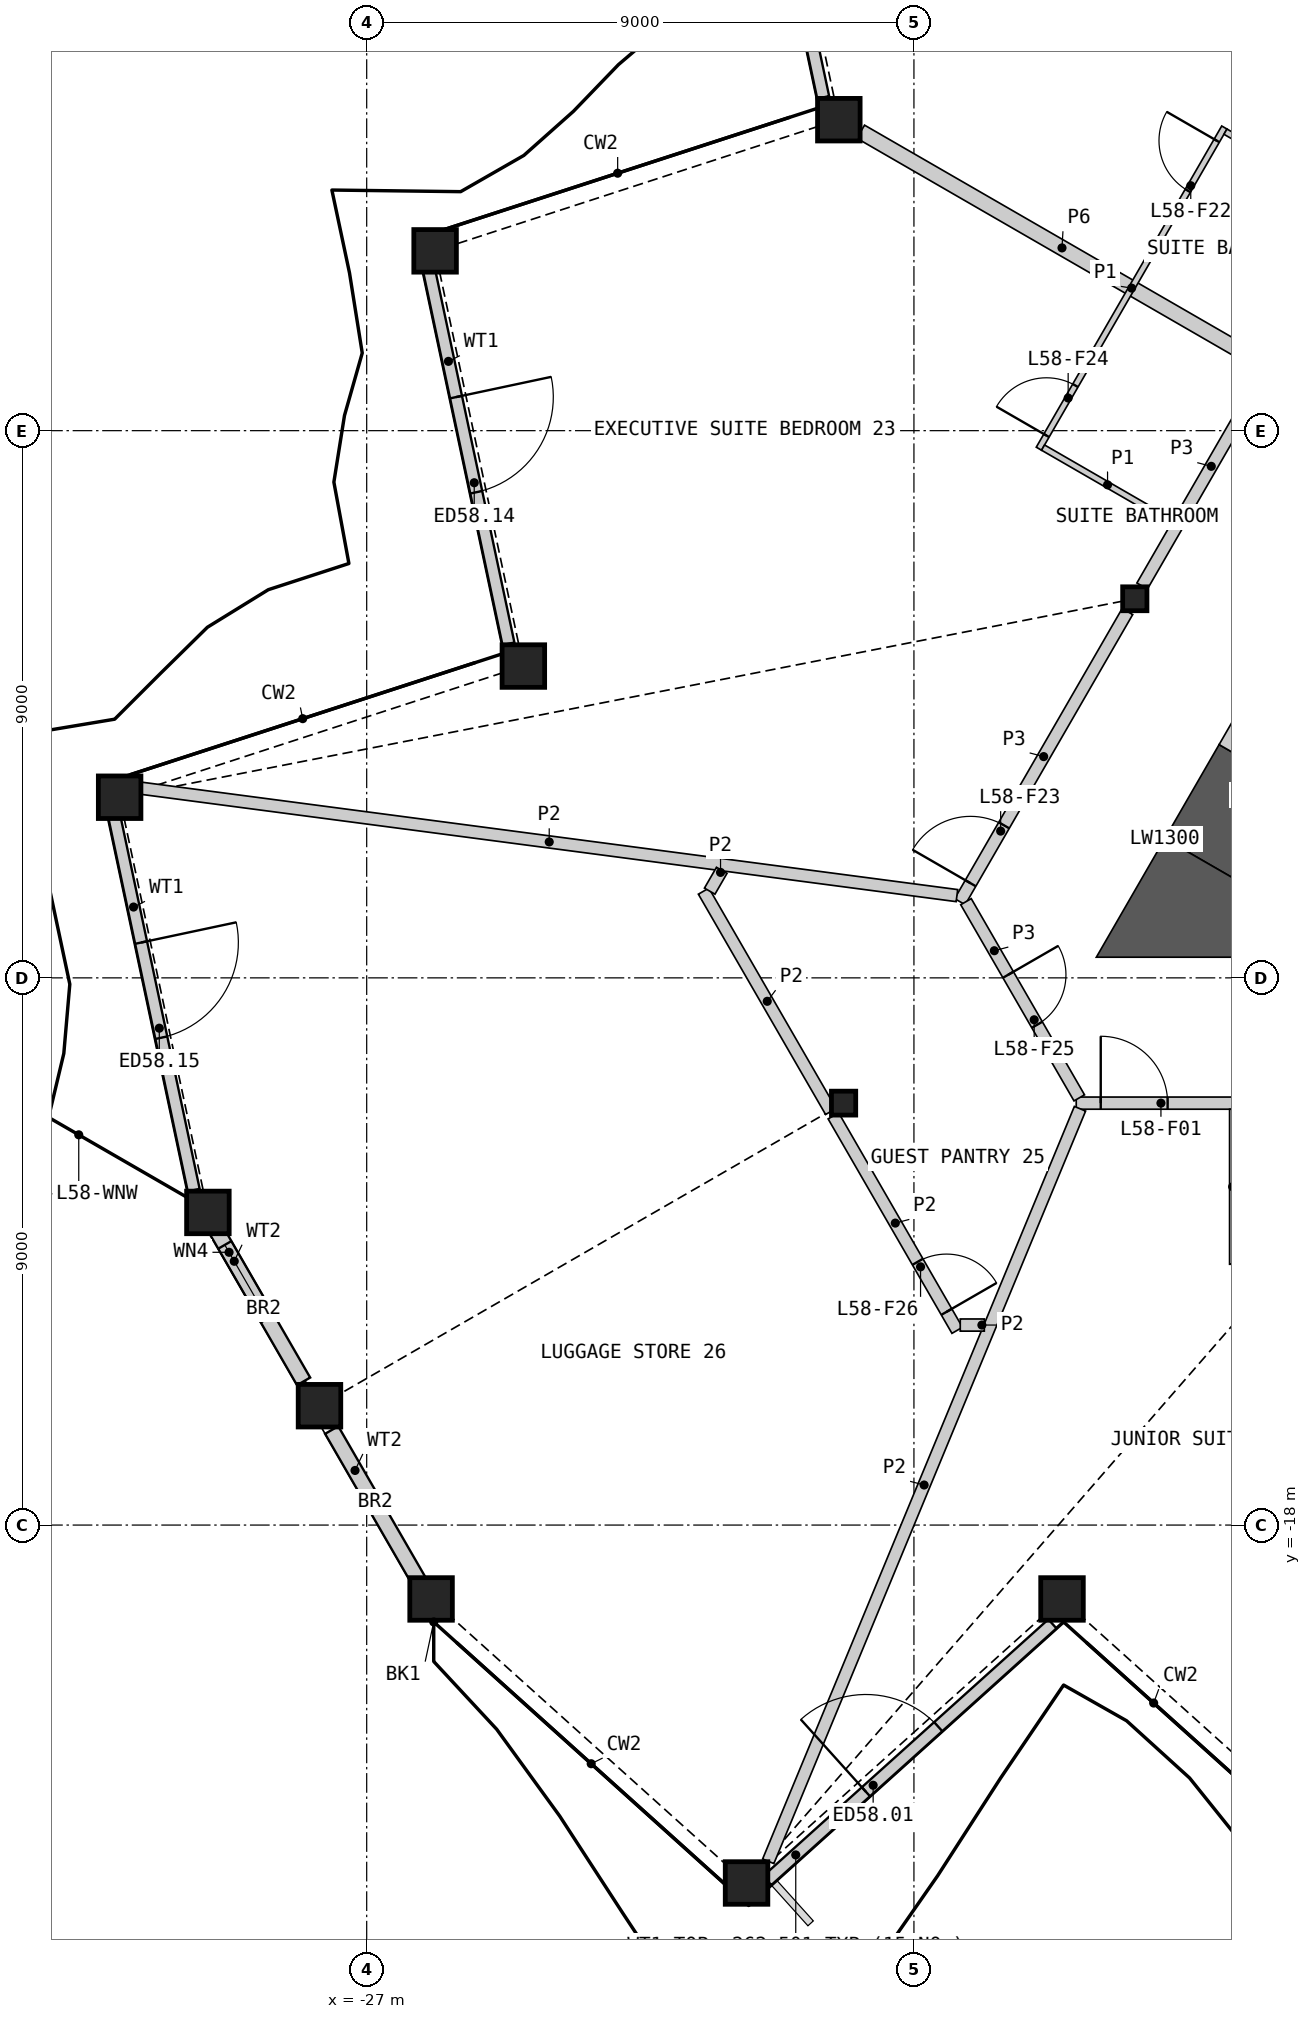
"""IFC4 building model, lengths in metres.
Left out: names, types, materials, properties, quantities, classifications, styles, units other than length and angle.
Written with IfcOpenShell. Run it as: python <this file> out.ifc"""

import sys

from ifc_helpers import new_model, si_unit, direction, frame, frame_2d, origin, origin_2d, place, context, subcontext, project, spatial, polyline, rectangle, hollow_rectangle, i_section, outline, extrude, element, fill, save


model = new_model("IFC4")
c1 = context("Model", 3, precision=1e-05, world=origin(), true_north=direction((0.0, 1.0)))
c2 = subcontext(c1, "Body", "Model", "MODEL_VIEW")
j1 = project(units=[si_unit("LENGTHUNIT", "METRE"), si_unit("PLANEANGLEUNIT", "RADIAN")], contexts=[c1])
p1 = place(None, origin())
s1 = spatial("IfcSite", under=j1, at=p1, CompositionType="ELEMENT")
p2 = place(p1, origin())
s2 = spatial("IfcBuilding", under=s1, at=p2, CompositionType="ELEMENT")
p3 = place(p2, frame((0.0, 0.0, 259.8)))
s3 = spatial("IfcBuildingStorey", under=s2, at=p3, CompositionType="ELEMENT", Elevation=259.8)
for number, where, z_axis, x_axis in (
    (1, (-25.941, -19.215, 0.0), (0.0, 0.0, 1.0), (1.0, 0.0, 0.0)),
    (2, (-20.753, -23.887, 0.0), (0.0, 0.0, 1.0), (1.0, 0.0, 0.0)),
    (3, (-15.565, -19.215, 0.0), (0.0, 0.0, 1.0), (1.0, 0.0, 0.0)),
    (4, (-19.235, 5.115, 0.0), (0.0, 0.0, 1.0), (1.0, 0.0, 0.0)),
    (5, (-25.875, 2.957, 0.0), (0.0, 0.0, 1.0), (1.0, 0.0, 0.0)),
    (6, (-24.423, -3.872, 0.0), (0.0, 0.0, 1.0), (1.0, 0.0, 0.0)),
    (7, (-31.063, -6.029, 0.0), (0.0, 0.0, 1.0), (1.0, 0.0, 0.0)),
    (8, (-29.612, -12.858, 0.0), (0.0, 0.0, 1.0), (1.0, 0.0, 0.0)),
    (9, (-27.776, -16.037, 0.0), (0.0, 0.0, 1.0), (1.0, 0.0, 0.0)),
):
    element("IfcColumn", number, at=place(p3, frame(where, z_axis=z_axis, x_axis=x_axis)), inside=s3, PredefinedType="COLUMN", context=c2, shape_type="SweptSolid", body=[
        extrude(hollow_rectangle(XDim=0.7, YDim=0.7, WallThickness=0.045, at=origin_2d()), origin(), (0.0, 0.0, 1.0), 3.6),
    ])
for number, where, z_axis, x_axis in (
    (10, (-14.368, -2.765, 0.0), (0.0, 0.0, 1.0), (1.0, 0.0, 0.0)),
    (11, (-19.157, -11.06, 0.0), (0.0, 0.0, 1.0), (1.0, 0.0, 0.0)),
):
    element("IfcColumn", number, at=place(p3, frame(where, z_axis=z_axis, x_axis=x_axis)), inside=s3, PredefinedType="COLUMN", context=c2, shape_type="SweptSolid", body=[
        extrude(i_section(OverallWidth=0.399, OverallDepth=0.393, WebThickness=0.023, FlangeThickness=0.037, at=origin_2d()), origin(), (0.0, 0.0, 1.0), 3.6),
    ])
p4 = place(p3, frame((-20.413, -23.848, 0.0), z_axis=(0.0, 0.0, 1.0), x_axis=(0.74314024121, 0.669135697668, 0.0)))
e12 = element("IfcWall", 12, at=p4, inside=s3, PredefinedType="SOLIDWALL", context=c2, shape_type="SweptSolid", body=[
    extrude(rectangle(XDim=6.311, YDim=0.2, at=frame_2d((3.156, 0.0))), origin(), (0.0, 0.0, 1.0), 2.701),
])
p5 = place(p4, frame((2.184, 0.0, 0.0)))
e13 = element("IfcOpeningElement", 13, at=p5, cuts=e12, PredefinedType="OPENING", context=c2, shape_type="SweptSolid", body=[
    extrude(rectangle(XDim=1.6, YDim=2.4, at=frame_2d((0.8, 1.2))), frame((0.0, 0.11, 0.0), z_axis=(0.0, -1.0, 0.0), x_axis=(1.0, 0.0, 0.0)), (0.0, 0.0, 1.0), 0.22),
])
p6 = place(p3, frame((-20.805, 11.659, 0.0), z_axis=(0.0, 0.0, 1.0), x_axis=(0.207913305093, -0.978147257608, 0.0)))
e14 = element("IfcWall", 14, at=p6, inside=s3, PredefinedType="SOLIDWALL", context=c2, shape_type="SweptSolid", body=[
    extrude(rectangle(XDim=6.316, YDim=0.2, at=frame_2d((3.158, 0.0))), origin(), (0.0, 0.0, 1.0), 2.701),
])
p7 = place(p6, frame((2.184, 0.0, 0.0)))
e15 = element("IfcOpeningElement", 15, at=p7, cuts=e14, PredefinedType="OPENING", context=c2, shape_type="SweptSolid", body=[
    extrude(rectangle(XDim=1.6, YDim=2.4, at=frame_2d((0.8, 1.2))), frame((0.0, 0.11, 0.0), z_axis=(0.0, -1.0, 0.0), x_axis=(1.0, 0.0, 0.0)), (0.0, 0.0, 1.0), 0.22),
])
p8 = place(p3, frame((-25.985, 2.688, 0.0), z_axis=(0.0, 0.0, 1.0), x_axis=(0.207906715746, -0.978148658205, 0.0)))
e16 = element("IfcWall", 16, at=p8, inside=s3, PredefinedType="SOLIDWALL", context=c2, shape_type="SweptSolid", body=[
    extrude(rectangle(XDim=6.332, YDim=0.2, at=frame_2d((3.166, 0.0))), origin(), (0.0, 0.0, 1.0), 2.701),
])
p9 = place(p8, frame((2.184, 0.0, 0.0)))
e17 = element("IfcOpeningElement", 17, at=p9, cuts=e16, PredefinedType="OPENING", context=c2, shape_type="SweptSolid", body=[
    extrude(rectangle(XDim=1.6, YDim=2.4, at=frame_2d((0.8, 1.2))), frame((0.0, 0.11, 0.0), z_axis=(0.0, -1.0, 0.0), x_axis=(1.0, 0.0, 0.0)), (0.0, 0.0, 1.0), 0.22),
])
p10 = place(p3, frame((-31.164, -6.283, 0.0), z_axis=(0.0, 0.0, 1.0), x_axis=(0.207900158502, -0.978150051932, 0.0)))
e18 = element("IfcWall", 18, at=p10, inside=s3, PredefinedType="SOLIDWALL", context=c2, shape_type="SweptSolid", body=[
    extrude(rectangle(XDim=6.347, YDim=0.2, at=frame_2d((3.174, 0.0))), origin(), (0.0, 0.0, 1.0), 2.701),
])
p11 = place(p10, frame((2.184, 0.0, 0.0)))
e19 = element("IfcOpeningElement", 19, at=p11, cuts=e18, PredefinedType="OPENING", context=c2, shape_type="SweptSolid", body=[
    extrude(rectangle(XDim=1.6, YDim=2.4, at=frame_2d((0.8, 1.2))), frame((0.0, 0.11, 0.0), z_axis=(0.0, -1.0, 0.0), x_axis=(1.0, 0.0, 0.0)), (0.0, 0.0, 1.0), 0.22),
])
p12 = place(p3, frame((-29.559, -13.002, 0.0), z_axis=(0.0, 0.0, 1.0), x_axis=(0.500023511883, -0.866011828767, 0.0)))
e20 = element("IfcWall", 20, at=p12, inside=s3, PredefinedType="SOLIDWALL", context=c2, shape_type="SweptSolid", body=[
    extrude(rectangle(XDim=3.042, YDim=0.25, at=frame_2d((1.521, 0.0))), origin(), (0.0, 0.0, 1.0), 2.701),
])
p13 = place(p12, frame((0.45, 0.0, 1.8)))
e21 = element("IfcOpeningElement", 21, at=p13, cuts=e20, PredefinedType="OPENING", context=c2, shape_type="SweptSolid", body=[
    extrude(rectangle(XDim=1.4, YDim=0.7, at=frame_2d((0.7, 0.35))), frame((0.0, 0.135, 0.0), z_axis=(0.0, -1.0, 0.0), x_axis=(1.0, 0.0, 0.0)), (0.0, 0.0, 1.0), 0.27),
])
p14 = place(p3, frame((-27.576, -16.437, 0.0), z_axis=(0.0, 0.0, 1.0), x_axis=(0.499976998774, -0.866038683141, 0.0)))
e22 = element("IfcWall", 22, at=p14, inside=s3, PredefinedType="SOLIDWALL", context=c2, shape_type="SweptSolid", body=[
    extrude(rectangle(XDim=3.072, YDim=0.25, at=frame_2d((1.536, 0.0))), origin(), (0.0, 0.0, 1.0), 2.701),
])
p15 = place(p3, frame((-12.418, -5.488, 0.0), z_axis=(0.0, 0.0, 1.0), x_axis=(-0.499931460552, -0.866064971437, 0.0)))
e23 = element("IfcWall", 23, at=p15, inside=s3, PredefinedType="SHEAR", context=c2, shape_type="SweptSolid", body=[
    extrude(rectangle(XDim=1.786, YDim=1.3, at=frame_2d((0.893, 0.0))), origin(), (0.0, 0.0, 1.0), 3.25),
])
p16 = place(p3, origin())
e24 = element("IfcWall", 24, at=p16, inside=s3, PredefinedType="SHEAR", context=c2, shape_type="SweptSolid", body=[
    extrude(outline(polyline([(-13.874, -6.71), (-12.748, -7.36), (-12.748, -8.66), (-15.0, -8.66), (-13.874, -6.71)])), origin(), (0.0, 0.0, 1.0), 3.25),
])
p17 = place(p3, frame((-11.318, -3.583, 0.0), z_axis=(0.0, 0.0, 1.0), x_axis=(-0.50002983664, -0.866008176907, 0.0)))
e25 = element("IfcWall", 25, at=p17, inside=s3, PredefinedType="SHEAR", context=c2, shape_type="SweptSolid", body=[
    extrude(rectangle(XDim=2.2, YDim=1.3, at=frame_2d((1.1, 0.0))), origin(), (0.0, 0.0, 1.0), 3.25),
])
p18 = place(p17, frame((0.65, 0.0, 0.0)))
e26 = element("IfcOpeningElement", 26, at=p18, cuts=e25, PredefinedType="OPENING", context=c2, shape_type="SweptSolid", body=[
    extrude(rectangle(XDim=1.0, YDim=2.1, at=frame_2d((0.5, 1.05))), frame((0.0, 0.66, 0.0), z_axis=(0.0, -1.0, 0.0), x_axis=(1.0, 0.0, 0.0)), (0.0, 0.0, 1.0), 1.32),
])
p19 = place(p3, frame((-14.247, -2.556, 0.0), z_axis=(0.0, 0.0, 1.0), x_axis=(0.49998193945, 0.866035830797, 0.0)))
e27 = element("IfcWall", 27, at=p19, inside=s3, PredefinedType="PARTITIONING", context=c2, shape_type="SweptSolid", body=[
    extrude(rectangle(XDim=9.094, YDim=0.2, at=frame_2d((4.547, 0.0))), origin(), (0.0, 0.0, 1.0), 3.25),
])
p20 = place(p3, frame((-18.875, 4.917, 0.0), z_axis=(0.0, 0.0, 1.0), x_axis=(0.866017519557, -0.500013655634, 0.0)))
e28 = element("IfcWall", 28, at=p20, inside=s3, PredefinedType="PARTITIONING", context=c2, shape_type="SweptSolid", body=[
    extrude(rectangle(XDim=7.644, YDim=0.25, at=frame_2d((3.822, 0.0))), origin(), (0.0, 0.0, 1.0), 2.404),
])
p21 = place(p3, frame((-15.331, -11.06, 0.0), z_axis=(0.0, 0.0, 1.0), x_axis=(1.0, 0.0, 0.0)))
e29 = element("IfcWall", 29, at=p21, inside=s3, PredefinedType="PARTITIONING", context=c2, shape_type="SweptSolid", body=[
    extrude(rectangle(XDim=5.543, YDim=0.2, at=frame_2d((2.771, 0.0))), origin(), (0.0, 0.0, 1.0), 3.25),
])
p22 = place(p21, frame((0.403, 0.0, 0.0)))
e30 = element("IfcOpeningElement", 30, at=p22, cuts=e29, PredefinedType="OPENING", context=c2, shape_type="SweptSolid", body=[
    extrude(rectangle(XDim=1.1, YDim=2.1, at=frame_2d((0.55, 1.05))), frame((0.0, 0.11, 0.0), z_axis=(0.0, -1.0, 0.0), x_axis=(1.0, 0.0, 0.0)), (0.0, 0.0, 1.0), 0.22),
])
p23 = place(p3, frame((-17.244, -7.747, 0.0), z_axis=(0.0, 0.0, 1.0), x_axis=(0.500017753321, 0.866015153657, 0.0)))
e31 = element("IfcWall", 31, at=p23, inside=s3, PredefinedType="PARTITIONING", context=c2, shape_type="SweptSolid", body=[
    extrude(rectangle(XDim=5.51, YDim=0.2, at=frame_2d((2.755, 0.0))), origin(), (0.0, 0.0, 1.0), 3.25),
])
p24 = place(p23, frame((0.35, 0.0, 0.0)))
e32 = element("IfcOpeningElement", 32, at=p24, cuts=e31, PredefinedType="OPENING", context=c2, shape_type="SweptSolid", body=[
    extrude(rectangle(XDim=1.1, YDim=2.1, at=frame_2d((0.55, 1.05))), frame((0.0, 0.11, 0.0), z_axis=(0.0, -1.0, 0.0), x_axis=(1.0, 0.0, 0.0)), (0.0, 0.0, 1.0), 0.22),
])
p25 = place(p3, frame((-17.144, -7.747, 0.0), z_axis=(0.0, 0.0, 1.0), x_axis=(0.499958791762, -0.866049194065, 0.0)))
e33 = element("IfcWall", 33, at=p25, inside=s3, PredefinedType="PARTITIONING", context=c2, shape_type="SweptSolid", body=[
    extrude(rectangle(XDim=3.726, YDim=0.2, at=frame_2d((1.863, 0.0))), origin(), (0.0, 0.0, 1.0), 3.25),
])
p26 = place(p25, frame((1.388, 0.0, 0.0)))
e34 = element("IfcOpeningElement", 34, at=p26, cuts=e33, PredefinedType="OPENING", context=c2, shape_type="SweptSolid", body=[
    extrude(rectangle(XDim=0.95, YDim=2.1, at=frame_2d((0.475, 1.05))), frame((0.0, 0.11, 0.0), z_axis=(0.0, -1.0, 0.0), x_axis=(1.0, 0.0, 0.0)), (0.0, 0.0, 1.0), 0.22),
])
p27 = place(p3, frame((-30.703, -5.882, 0.0), z_axis=(0.0, 0.0, 1.0), x_axis=(0.991445815272, -0.130518946443, 0.0)))
e35 = element("IfcWall", 35, at=p27, inside=s3, PredefinedType="PARTITIONING", context=c2, shape_type="SweptSolid", body=[
    extrude(rectangle(XDim=13.526, YDim=0.2, at=frame_2d((6.763, 0.0))), origin(), (0.0, 0.0, 1.0), 2.404),
])
p28 = place(p3, frame((-20.396, -23.53, 0.0), z_axis=(0.0, 0.0, 1.0), x_axis=(0.382692998932, 0.923875569851, 0.0)))
e36 = element("IfcWall", 36, at=p28, inside=s3, PredefinedType="PARTITIONING", context=c2, shape_type="SweptSolid", body=[
    extrude(rectangle(XDim=13.397, YDim=0.2, at=frame_2d((6.698, 0.0))), origin(), (0.0, 0.0, 1.0), 2.404),
])
p29 = place(p3, frame((-21.458, -7.574, 0.0), z_axis=(0.0, 0.0, 1.0), x_axis=(0.499973304129, -0.866040816104, 0.0)))
e37 = element("IfcWall", 37, at=p29, inside=s3, PredefinedType="PARTITIONING", context=c2, shape_type="SweptSolid", body=[
    extrude(rectangle(XDim=4.184, YDim=0.2, at=frame_2d((2.092, 0.0))), origin(), (0.0, 0.0, 1.0), 2.404),
])
p30 = place(p3, frame((-19.325, -11.27, 0.0), z_axis=(0.0, 0.0, 1.0), x_axis=(0.500000928893, -0.866024867487, 0.0)))
e38 = element("IfcWall", 38, at=p30, inside=s3, PredefinedType="PARTITIONING", context=c2, shape_type="SweptSolid", body=[
    extrude(rectangle(XDim=4.073, YDim=0.2, at=frame_2d((2.036, 0.0))), origin(), (0.0, 0.0, 1.0), 2.404),
])
p31 = place(p30, frame((2.772, 0.0, 0.0)))
e39 = element("IfcOpeningElement", 39, at=p31, cuts=e38, PredefinedType="OPENING", context=c2, shape_type="SweptSolid", body=[
    extrude(rectangle(XDim=0.95, YDim=2.1, at=frame_2d((0.475, 1.05))), frame((0.0, 0.11, 0.0), z_axis=(0.0, -1.0, 0.0), x_axis=(1.0, 0.0, 0.0)), (0.0, 0.0, 1.0), 0.22),
])
for number, where, z_axis, x_axis in (
    (40, (-17.238, -14.71, 0.0), (0.0, 0.0, 1.0), (1.0, 0.0, 0.0)),
    (41, (-21.359, -7.574, 0.0), (0.0, 0.0, 1.0), (0.5, 0.866, 0.0)),
):
    element("IfcWall", number, at=place(p3, frame(where, z_axis=z_axis, x_axis=x_axis)), inside=s3, PredefinedType="PARTITIONING", context=c2, shape_type="SweptSolid", body=[
        extrude(rectangle(XDim=0.396, YDim=0.2, at=frame_2d((0.198, 0.0))), origin(), (0.0, 0.0, 1.0), 2.404),
    ])
p32 = place(p3, frame((-15.945, -0.297, 0.0), z_axis=(0.0, 0.0, 1.0), x_axis=(0.499978833458, 0.866037623948, 0.0)))
e42 = element("IfcWall", 42, at=p32, inside=s3, PredefinedType="PARTITIONING", context=c2, shape_type="SweptSolid", body=[
    extrude(rectangle(XDim=6.1, YDim=0.1, at=frame_2d((3.05, 0.0))), origin(), (0.0, 0.0, 1.0), 2.404),
])
p33 = place(p32, frame((4.9, 0.0, 0.0)))
e43 = element("IfcOpeningElement", 43, at=p33, cuts=e42, PredefinedType="OPENING", context=c2, shape_type="SweptSolid", body=[
    extrude(rectangle(XDim=0.95, YDim=2.1, at=frame_2d((0.475, 1.05))), frame((0.0, 0.06, 0.0), z_axis=(0.0, -1.0, 0.0), x_axis=(1.0, 0.0, 0.0)), (0.0, 0.0, 1.0), 0.12),
])
p34 = place(p32, frame((0.25, 0.0, 0.0)))
e44 = element("IfcOpeningElement", 44, at=p34, cuts=e42, PredefinedType="OPENING", context=c2, shape_type="SweptSolid", body=[
    extrude(rectangle(XDim=0.95, YDim=2.1, at=frame_2d((0.475, 1.05))), frame((0.0, 0.06, 0.0), z_axis=(0.0, -1.0, 0.0), x_axis=(1.0, 0.0, 0.0)), (0.0, 0.0, 1.0), 0.12),
])
p35 = place(p3, frame((-12.877, 4.917, 0.0), z_axis=(0.0, 0.0, 1.0), x_axis=(0.866057815567, -0.499943856944, 0.0)))
e45 = element("IfcWall", 45, at=p35, inside=s3, PredefinedType="PARTITIONING", context=c2, shape_type="SweptSolid", body=[
    extrude(rectangle(XDim=2.45, YDim=0.1, at=frame_2d((1.225, 0.0))), origin(), (0.0, 0.0, 1.0), 2.404),
])
p36 = place(p3, frame((-12.759, -13.71, 0.0), z_axis=(0.0, 0.0, 1.0), x_axis=(0.0, 1.0, 0.0)))
e46 = element("IfcWall", 46, at=p36, inside=s3, PredefinedType="PARTITIONING", context=c2, shape_type="SweptSolid", body=[
    extrude(rectangle(XDim=2.55, YDim=0.1, at=frame_2d((1.275, 0.0))), origin(), (0.0, 0.0, 1.0), 2.404),
])
p37 = place(p3, frame((-15.877, -0.279, 0.0), z_axis=(0.0, 0.0, 1.0), x_axis=(0.866057815567, -0.499943856944, 0.0)))
e47 = element("IfcWall", 47, at=p37, inside=s3, PredefinedType="PARTITIONING", context=c2, shape_type="SweptSolid", body=[
    extrude(rectangle(XDim=2.45, YDim=0.1, at=frame_2d((1.225, 0.0))), origin(), (0.0, 0.0, 1.0), 2.404),
])
p38 = place(p5, origin())
e48 = element("IfcDoor", 48, at=p38, inside=s3, OperationType="DOUBLE_DOOR_SINGLE_SWING", PredefinedType="DOOR", context=c2, shape_type="SweptSolid", body=[
    extrude(rectangle(XDim=1.6, YDim=2.4, at=frame_2d((0.8, 1.2))), frame((0.0, 0.025, 0.0), z_axis=(0.0, -1.0, 0.0), x_axis=(1.0, 0.0, 0.0)), (0.0, 0.0, 1.0), 0.05),
])
fill(e13, e48)
p39 = place(p9, origin())
e49 = element("IfcDoor", 49, at=p39, inside=s3, OperationType="DOUBLE_DOOR_SINGLE_SWING", PredefinedType="DOOR", context=c2, shape_type="SweptSolid", body=[
    extrude(rectangle(XDim=1.6, YDim=2.4, at=frame_2d((0.8, 1.2))), frame((0.0, 0.025, 0.0), z_axis=(0.0, -1.0, 0.0), x_axis=(1.0, 0.0, 0.0)), (0.0, 0.0, 1.0), 0.05),
])
fill(e17, e49)
p40 = place(p11, origin())
e50 = element("IfcDoor", 50, at=p40, inside=s3, OperationType="DOUBLE_DOOR_SINGLE_SWING", PredefinedType="DOOR", context=c2, shape_type="SweptSolid", body=[
    extrude(rectangle(XDim=1.6, YDim=2.4, at=frame_2d((0.8, 1.2))), frame((0.0, 0.025, 0.0), z_axis=(0.0, -1.0, 0.0), x_axis=(1.0, 0.0, 0.0)), (0.0, 0.0, 1.0), 0.05),
])
fill(e19, e50)
p41 = place(p13, origin())
e51 = element("IfcWindow", 51, at=p41, inside=s3, PartitioningType="SINGLE_PANEL", PredefinedType="WINDOW", context=c2, shape_type="SweptSolid", body=[
    extrude(rectangle(XDim=1.4, YDim=0.7, at=frame_2d((0.7, 0.35))), frame((0.0, 0.03, 0.0), z_axis=(0.0, -1.0, 0.0), x_axis=(1.0, 0.0, 0.0)), (0.0, 0.0, 1.0), 0.06),
])
fill(e21, e51)
p42 = place(p22, origin())
e52 = element("IfcDoor", 52, at=p42, inside=s3, OperationType="SINGLE_SWING_LEFT", PredefinedType="DOOR", context=c2, shape_type="SweptSolid", body=[
    extrude(rectangle(XDim=1.1, YDim=2.1, at=frame_2d((0.55, 1.05))), frame((0.0, 0.025, 0.0), z_axis=(0.0, -1.0, 0.0), x_axis=(1.0, 0.0, 0.0)), (0.0, 0.0, 1.0), 0.05),
])
fill(e30, e52)
p43 = place(p33, origin())
e53 = element("IfcDoor", 53, at=p43, inside=s3, OperationType="SINGLE_SWING_RIGHT", PredefinedType="DOOR", context=c2, shape_type="SweptSolid", body=[
    extrude(rectangle(XDim=0.95, YDim=2.1, at=frame_2d((0.475, 1.05))), frame((0.0, 0.025, 0.0), z_axis=(0.0, -1.0, 0.0), x_axis=(1.0, 0.0, 0.0)), (0.0, 0.0, 1.0), 0.05),
])
fill(e43, e53)
p44 = place(p24, origin())
e54 = element("IfcDoor", 54, at=p44, inside=s3, OperationType="SINGLE_SWING_LEFT", PredefinedType="DOOR", context=c2, shape_type="SweptSolid", body=[
    extrude(rectangle(XDim=1.1, YDim=2.1, at=frame_2d((0.55, 1.05))), frame((0.0, 0.025, 0.0), z_axis=(0.0, -1.0, 0.0), x_axis=(1.0, 0.0, 0.0)), (0.0, 0.0, 1.0), 0.05),
])
fill(e32, e54)
p45 = place(p34, origin())
e55 = element("IfcDoor", 55, at=p45, inside=s3, OperationType="SINGLE_SWING_LEFT", PredefinedType="DOOR", context=c2, shape_type="SweptSolid", body=[
    extrude(rectangle(XDim=0.95, YDim=2.1, at=frame_2d((0.475, 1.05))), frame((0.0, 0.025, 0.0), z_axis=(0.0, -1.0, 0.0), x_axis=(1.0, 0.0, 0.0)), (0.0, 0.0, 1.0), 0.05),
])
fill(e44, e55)
p46 = place(p26, origin())
e56 = element("IfcDoor", 56, at=p46, inside=s3, OperationType="SINGLE_SWING_LEFT", PredefinedType="DOOR", context=c2, shape_type="SweptSolid", body=[
    extrude(rectangle(XDim=0.95, YDim=2.1, at=frame_2d((0.475, 1.05))), frame((0.0, 0.025, 0.0), z_axis=(0.0, -1.0, 0.0), x_axis=(1.0, 0.0, 0.0)), (0.0, 0.0, 1.0), 0.05),
])
fill(e34, e56)
p47 = place(p31, origin())
e57 = element("IfcDoor", 57, at=p47, inside=s3, OperationType="SINGLE_SWING_RIGHT", PredefinedType="DOOR", context=c2, shape_type="SweptSolid", body=[
    extrude(rectangle(XDim=0.95, YDim=2.1, at=frame_2d((0.475, 1.05))), frame((0.0, 0.025, 0.0), z_axis=(0.0, -1.0, 0.0), x_axis=(1.0, 0.0, 0.0)), (0.0, 0.0, 1.0), 0.05),
])
fill(e39, e57)
save(model, sys.argv[1])
